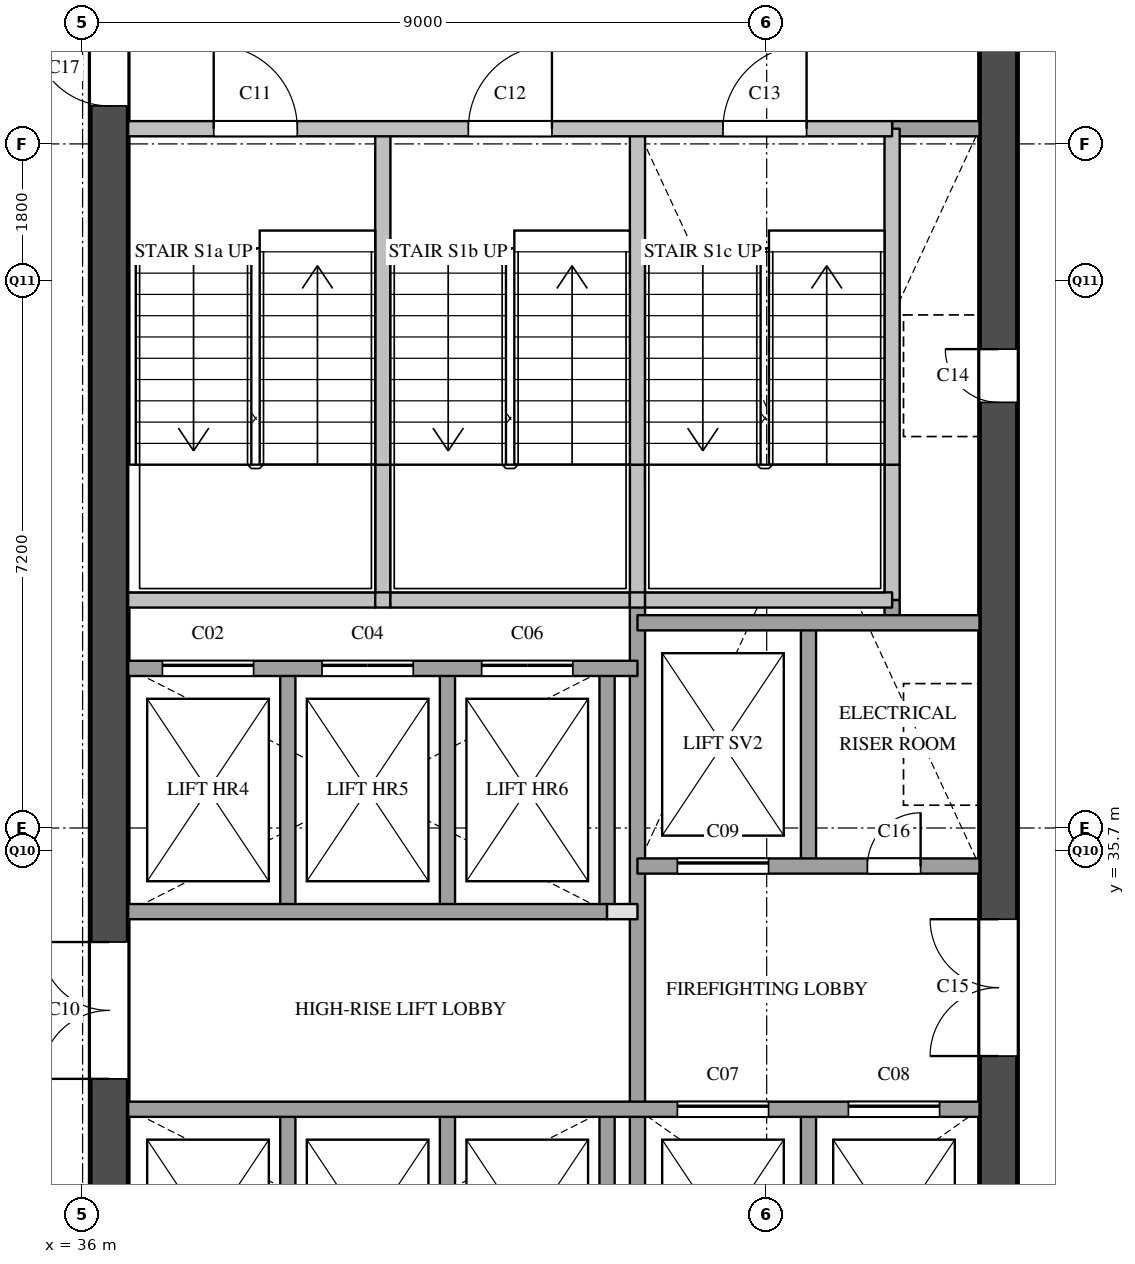
"""IFC4 building model, lengths in metres.
Left out: names, types, materials, properties, quantities, classifications, styles, units other than length and angle.
Written with IfcOpenShell. Run it as: python <this file> out.ifc"""

import sys

from ifc_helpers import new_model, si_unit, direction, frame, frame_2d, origin, place, context, subcontext, project, spatial, rectangle, extrude, element, fill, save


model = new_model("IFC4")
c1 = context("Model", 3, precision=1e-05, world=origin(), true_north=direction((0.0, 1.0)))
c2 = subcontext(c1, "Body", "Model", "MODEL_VIEW")
j1 = project(units=[si_unit("LENGTHUNIT", "METRE"), si_unit("PLANEANGLEUNIT", "RADIAN")], contexts=[c1])
p1 = place(None, origin())
s1 = spatial("IfcSite", under=j1, at=p1, CompositionType="ELEMENT")
p2 = place(p1, origin())
s2 = spatial("IfcBuilding", under=s1, at=p2, CompositionType="ELEMENT")
p3 = place(p2, frame((0.0, 0.0, 170.0)))
s3 = spatial("IfcBuildingStorey", under=s2, at=p3, CompositionType="ELEMENT", Elevation=170.0)
p4 = place(p3, frame((36.35, 29.1, 0.0), z_axis=(0.0, 0.0, 1.0), x_axis=(0.0, 1.0, 0.0)))
e1 = element("IfcWall", 1, at=p4, inside=s3, PredefinedType="SHEAR", context=c2, shape_type="SweptSolid", body=[
    extrude(rectangle(XDim=20.3, YDim=0.5, at=frame_2d((10.15, 0.0))), origin(), (0.0, 0.0, 1.0), 3.6),
])
p5 = place(p4, frame((3.6, 0.0, 0.0)))
e2 = element("IfcOpeningElement", 2, at=p5, cuts=e1, PredefinedType="OPENING", context=c2, shape_type="SweptSolid", body=[
    extrude(rectangle(XDim=1.8, YDim=2.1, at=frame_2d((0.9, 1.05))), frame((0.0, 0.26, 0.0), z_axis=(0.0, -1.0, 0.0), x_axis=(1.0, 0.0, 0.0)), (0.0, 0.0, 1.0), 0.52),
])
p6 = place(p4, frame((16.4, 0.0, 0.0)))
e3 = element("IfcOpeningElement", 3, at=p6, cuts=e1, PredefinedType="OPENING", context=c2, shape_type="SweptSolid", body=[
    extrude(rectangle(XDim=1.0, YDim=2.1, at=frame_2d((0.5, 1.05))), frame((0.0, 0.26, 0.0), z_axis=(0.0, -1.0, 0.0), x_axis=(1.0, 0.0, 0.0)), (0.0, 0.0, 1.0), 0.52),
])
p7 = place(p3, frame((48.05, 29.1, 0.0), z_axis=(0.0, 0.0, 1.0), x_axis=(0.0, 1.0, 0.0)))
e4 = element("IfcWall", 4, at=p7, inside=s3, PredefinedType="SHEAR", context=c2, shape_type="SweptSolid", body=[
    extrude(rectangle(XDim=20.3, YDim=0.5, at=frame_2d((10.15, 0.0))), origin(), (0.0, 0.0, 1.0), 3.6),
])
p8 = place(p7, frame((12.5, 0.0, 0.0)))
e5 = element("IfcOpeningElement", 5, at=p8, cuts=e4, PredefinedType="OPENING", context=c2, shape_type="SweptSolid", body=[
    extrude(rectangle(XDim=0.7, YDim=2.1, at=frame_2d((0.35, 1.05))), frame((0.0, 0.26, 0.0), z_axis=(0.0, -1.0, 0.0), x_axis=(1.0, 0.0, 0.0)), (0.0, 0.0, 1.0), 0.52),
])
p9 = place(p7, frame((3.9, 0.0, 0.0)))
e6 = element("IfcOpeningElement", 6, at=p9, cuts=e4, PredefinedType="OPENING", context=c2, shape_type="SweptSolid", body=[
    extrude(rectangle(XDim=1.8, YDim=2.1, at=frame_2d((0.9, 1.05))), frame((0.0, 0.26, 0.0), z_axis=(0.0, -1.0, 0.0), x_axis=(1.0, 0.0, 0.0)), (0.0, 0.0, 1.0), 0.52),
])
p10 = place(p3, frame((38.7, 29.1, 0.0), z_axis=(0.0, 0.0, 1.0), x_axis=(0.0, 1.0, 0.0)))
e7 = element("IfcWall", 7, at=p10, inside=s3, PredefinedType="SOLIDWALL", context=c2, shape_type="SweptSolid", body=[
    extrude(rectangle(XDim=3.2, YDim=0.2, at=frame_2d((1.6, 0.0))), origin(), (0.0, 0.0, 1.0), 3.6),
])
p11 = place(p3, frame((38.7, 34.9, 0.0), z_axis=(0.0, 0.0, 1.0), x_axis=(0.0, 1.0, 0.0)))
e8 = element("IfcWall", 8, at=p11, inside=s3, PredefinedType="SOLIDWALL", context=c2, shape_type="SweptSolid", body=[
    extrude(rectangle(XDim=3.2, YDim=0.2, at=frame_2d((1.6, 0.0))), origin(), (0.0, 0.0, 1.0), 3.6),
])
p12 = place(p3, frame((39.95, 39.0, 0.0), z_axis=(0.0, 0.0, 1.0), x_axis=(0.0, 1.0, 0.0)))
e9 = element("IfcWall", 9, at=p12, inside=s3, PredefinedType="SOLIDWALL", context=c2, shape_type="SweptSolid", body=[
    extrude(rectangle(XDim=1.78, YDim=0.2, at=frame_2d((0.89, 0.0))), origin(), (0.0, 0.0, 1.0), 3.6),
])
p13 = place(p3, frame((39.95, 40.78, 0.0), z_axis=(0.0, 0.0, 1.0), x_axis=(0.0, 1.0, 0.0)))
e10 = element("IfcWall", 10, at=p13, inside=s3, PredefinedType="SOLIDWALL", context=c2, shape_type="SweptSolid", body=[
    extrude(rectangle(XDim=4.42, YDim=0.2, at=frame_2d((2.21, 0.0))), origin(), (0.0, 0.0, 1.0), 3.6),
])
p14 = place(p3, frame((40.8, 29.1, 0.0), z_axis=(0.0, 0.0, 1.0), x_axis=(0.0, 1.0, 0.0)))
e11 = element("IfcWall", 11, at=p14, inside=s3, PredefinedType="SOLIDWALL", context=c2, shape_type="SweptSolid", body=[
    extrude(rectangle(XDim=3.2, YDim=0.2, at=frame_2d((1.6, 0.0))), origin(), (0.0, 0.0, 1.0), 3.6),
])
p15 = place(p3, frame((40.8, 34.9, 0.0), z_axis=(0.0, 0.0, 1.0), x_axis=(0.0, 1.0, 0.0)))
e12 = element("IfcWall", 12, at=p15, inside=s3, PredefinedType="SOLIDWALL", context=c2, shape_type="SweptSolid", body=[
    extrude(rectangle(XDim=3.2, YDim=0.2, at=frame_2d((1.6, 0.0))), origin(), (0.0, 0.0, 1.0), 3.6),
])
p16 = place(p3, frame((42.9, 29.1, 0.0), z_axis=(0.0, 0.0, 1.0), x_axis=(0.0, 1.0, 0.0)))
e13 = element("IfcWall", 13, at=p16, inside=s3, PredefinedType="SOLIDWALL", context=c2, shape_type="SweptSolid", body=[
    extrude(rectangle(XDim=3.2, YDim=0.2, at=frame_2d((1.6, 0.0))), origin(), (0.0, 0.0, 1.0), 3.6),
])
p17 = place(p3, frame((42.9, 34.9, 0.0), z_axis=(0.0, 0.0, 1.0), x_axis=(0.0, 1.0, 0.0)))
e14 = element("IfcWall", 14, at=p17, inside=s3, PredefinedType="SOLIDWALL", context=c2, shape_type="SweptSolid", body=[
    extrude(rectangle(XDim=3.2, YDim=0.2, at=frame_2d((1.6, 0.0))), origin(), (0.0, 0.0, 1.0), 3.6),
])
p18 = place(p3, frame((43.3, 29.1, 0.0), z_axis=(0.0, 0.0, 1.0), x_axis=(0.0, 1.0, 0.0)))
e15 = element("IfcWall", 15, at=p18, inside=s3, PredefinedType="SOLIDWALL", context=c2, shape_type="SweptSolid", body=[
    extrude(rectangle(XDim=9.9, YDim=0.2, at=frame_2d((4.95, 0.0))), origin(), (0.0, 0.0, 1.0), 3.6),
])
p19 = place(p3, frame((43.3, 39.0, 0.0), z_axis=(0.0, 0.0, 1.0), x_axis=(0.0, 1.0, 0.0)))
e16 = element("IfcWall", 16, at=p19, inside=s3, PredefinedType="SOLIDWALL", context=c2, shape_type="SweptSolid", body=[
    extrude(rectangle(XDim=1.78, YDim=0.2, at=frame_2d((0.89, 0.0))), origin(), (0.0, 0.0, 1.0), 3.6),
])
p20 = place(p3, frame((43.3, 40.78, 0.0), z_axis=(0.0, 0.0, 1.0), x_axis=(0.0, 1.0, 0.0)))
e17 = element("IfcWall", 17, at=p20, inside=s3, PredefinedType="SOLIDWALL", context=c2, shape_type="SweptSolid", body=[
    extrude(rectangle(XDim=4.42, YDim=0.2, at=frame_2d((2.21, 0.0))), origin(), (0.0, 0.0, 1.0), 3.6),
])
for number, where, z_axis, x_axis in (
    (18, (45.55, 29.1, 0.0), (0.0, 0.0, 1.0), (0.0, 1.0, 0.0)),
    (19, (45.55, 35.5, 0.0), (0.0, 0.0, 1.0), (0.0, 1.0, 0.0)),
):
    element("IfcWall", number, at=place(p3, frame(where, z_axis=z_axis, x_axis=x_axis)), inside=s3, PredefinedType="SOLIDWALL", context=c2, shape_type="SweptSolid", body=[
        extrude(rectangle(XDim=3.2, YDim=0.2, at=frame_2d((1.6, 0.0))), origin(), (0.0, 0.0, 1.0), 3.6),
    ])
p21 = place(p3, frame((46.65, 38.7, 0.0), z_axis=(0.0, 0.0, 1.0), x_axis=(0.0, 1.0, 0.0)))
e20 = element("IfcWall", 20, at=p21, inside=s3, PredefinedType="SOLIDWALL", context=c2, shape_type="SweptSolid", body=[
    extrude(rectangle(XDim=0.3, YDim=0.2, at=frame_2d((0.15, 0.0))), origin(), (0.0, 0.0, 1.0), 3.6),
])
p22 = place(p3, frame((46.65, 39.0, 0.0), z_axis=(0.0, 0.0, 1.0), x_axis=(0.0, 1.0, 0.0)))
e21 = element("IfcWall", 21, at=p22, inside=s3, PredefinedType="SOLIDWALL", context=c2, shape_type="SweptSolid", body=[
    extrude(rectangle(XDim=1.78, YDim=0.2, at=frame_2d((0.89, 0.0))), origin(), (0.0, 0.0, 1.0), 3.6),
])
p23 = place(p3, frame((46.65, 40.78, 0.0), z_axis=(0.0, 0.0, 1.0), x_axis=(0.0, 1.0, 0.0)))
e22 = element("IfcWall", 22, at=p23, inside=s3, PredefinedType="SOLIDWALL", context=c2, shape_type="SweptSolid", body=[
    extrude(rectangle(XDim=4.42, YDim=0.2, at=frame_2d((2.21, 0.0))), origin(), (0.0, 0.0, 1.0), 3.6),
])
p24 = place(p3, frame((36.6, 32.3, 0.0), z_axis=(0.0, 0.0, 1.0), x_axis=(1.0, 0.0, 0.0)))
e23 = element("IfcWall", 23, at=p24, inside=s3, PredefinedType="SOLIDWALL", context=c2, shape_type="SweptSolid", body=[
    extrude(rectangle(XDim=11.2, YDim=0.2, at=frame_2d((5.6, 0.0))), origin(), (0.0, 0.0, 1.0), 3.6),
])
p25 = place(p24, frame((7.225, 0.0, 0.0)))
e24 = element("IfcOpeningElement", 24, at=p25, cuts=e23, PredefinedType="OPENING", context=c2, shape_type="SweptSolid", body=[
    extrude(rectangle(XDim=1.2, YDim=2.1, at=frame_2d((0.6, 1.05))), frame((0.0, 0.11, 0.0), z_axis=(0.0, -1.0, 0.0), x_axis=(1.0, 0.0, 0.0)), (0.0, 0.0, 1.0), 0.22),
])
p26 = place(p24, frame((9.475, 0.0, 0.0)))
e25 = element("IfcOpeningElement", 25, at=p26, cuts=e23, PredefinedType="OPENING", context=c2, shape_type="SweptSolid", body=[
    extrude(rectangle(XDim=1.2, YDim=2.1, at=frame_2d((0.6, 1.05))), frame((0.0, 0.11, 0.0), z_axis=(0.0, -1.0, 0.0), x_axis=(1.0, 0.0, 0.0)), (0.0, 0.0, 1.0), 0.22),
])
p27 = place(p3, frame((42.9, 34.9, 0.0), z_axis=(0.0, 0.0, 1.0), x_axis=(1.0, 0.0, 0.0)))
e26 = element("IfcWall", 26, at=p27, inside=s3, PredefinedType="PARTITIONING", context=c2, shape_type="SweptSolid", body=[
    extrude(rectangle(XDim=0.4, YDim=0.2, at=frame_2d((0.2, 0.0))), origin(), (0.0, 0.0, 1.0), 3.6),
])
p28 = place(p3, frame((36.6, 34.9, 0.0), z_axis=(0.0, 0.0, 1.0), x_axis=(1.0, 0.0, 0.0)))
e27 = element("IfcWall", 27, at=p28, inside=s3, PredefinedType="SOLIDWALL", context=c2, shape_type="SweptSolid", body=[
    extrude(rectangle(XDim=6.3, YDim=0.2, at=frame_2d((3.15, 0.0))), origin(), (0.0, 0.0, 1.0), 3.6),
])
p29 = place(p3, frame((43.3, 35.5, 0.0), z_axis=(0.0, 0.0, 1.0), x_axis=(1.0, 0.0, 0.0)))
e28 = element("IfcWall", 28, at=p29, inside=s3, PredefinedType="SOLIDWALL", context=c2, shape_type="SweptSolid", body=[
    extrude(rectangle(XDim=4.5, YDim=0.2, at=frame_2d((2.25, 0.0))), origin(), (0.0, 0.0, 1.0), 3.6),
])
p30 = place(p29, frame((0.525, 0.0, 0.0)))
e29 = element("IfcOpeningElement", 29, at=p30, cuts=e28, PredefinedType="OPENING", context=c2, shape_type="SweptSolid", body=[
    extrude(rectangle(XDim=1.2, YDim=2.1, at=frame_2d((0.6, 1.05))), frame((0.0, 0.11, 0.0), z_axis=(0.0, -1.0, 0.0), x_axis=(1.0, 0.0, 0.0)), (0.0, 0.0, 1.0), 0.22),
])
p31 = place(p29, frame((3.025, 0.0, 0.0)))
e30 = element("IfcOpeningElement", 30, at=p31, cuts=e28, PredefinedType="OPENING", context=c2, shape_type="SweptSolid", body=[
    extrude(rectangle(XDim=0.7, YDim=2.1, at=frame_2d((0.35, 1.05))), frame((0.0, 0.11, 0.0), z_axis=(0.0, -1.0, 0.0), x_axis=(1.0, 0.0, 0.0)), (0.0, 0.0, 1.0), 0.22),
])
p32 = place(p3, frame((36.6, 38.1, 0.0), z_axis=(0.0, 0.0, 1.0), x_axis=(1.0, 0.0, 0.0)))
e31 = element("IfcWall", 31, at=p32, inside=s3, PredefinedType="SOLIDWALL", context=c2, shape_type="SweptSolid", body=[
    extrude(rectangle(XDim=6.7, YDim=0.2, at=frame_2d((3.35, 0.0))), origin(), (0.0, 0.0, 1.0), 3.6),
])
p33 = place(p32, frame((0.45, 0.0, 0.0)))
e32 = element("IfcOpeningElement", 32, at=p33, cuts=e31, PredefinedType="OPENING", context=c2, shape_type="SweptSolid", body=[
    extrude(rectangle(XDim=1.2, YDim=2.1, at=frame_2d((0.6, 1.05))), frame((0.0, 0.11, 0.0), z_axis=(0.0, -1.0, 0.0), x_axis=(1.0, 0.0, 0.0)), (0.0, 0.0, 1.0), 0.22),
])
p34 = place(p32, frame((2.55, 0.0, 0.0)))
e33 = element("IfcOpeningElement", 33, at=p34, cuts=e31, PredefinedType="OPENING", context=c2, shape_type="SweptSolid", body=[
    extrude(rectangle(XDim=1.2, YDim=2.1, at=frame_2d((0.6, 1.05))), frame((0.0, 0.11, 0.0), z_axis=(0.0, -1.0, 0.0), x_axis=(1.0, 0.0, 0.0)), (0.0, 0.0, 1.0), 0.22),
])
p35 = place(p32, frame((4.65, 0.0, 0.0)))
e34 = element("IfcOpeningElement", 34, at=p35, cuts=e31, PredefinedType="OPENING", context=c2, shape_type="SweptSolid", body=[
    extrude(rectangle(XDim=1.2, YDim=2.1, at=frame_2d((0.6, 1.05))), frame((0.0, 0.11, 0.0), z_axis=(0.0, -1.0, 0.0), x_axis=(1.0, 0.0, 0.0)), (0.0, 0.0, 1.0), 0.22),
])
p36 = place(p3, frame((43.3, 38.7, 0.0), z_axis=(0.0, 0.0, 1.0), x_axis=(1.0, 0.0, 0.0)))
e35 = element("IfcWall", 35, at=p36, inside=s3, PredefinedType="SOLIDWALL", context=c2, shape_type="SweptSolid", body=[
    extrude(rectangle(XDim=4.5, YDim=0.2, at=frame_2d((2.25, 0.0))), origin(), (0.0, 0.0, 1.0), 3.6),
])
p37 = place(p3, frame((36.6, 39.0, 0.0), z_axis=(0.0, 0.0, 1.0), x_axis=(1.0, 0.0, 0.0)))
e36 = element("IfcWall", 36, at=p37, inside=s3, PredefinedType="SOLIDWALL", context=c2, shape_type="SweptSolid", body=[
    extrude(rectangle(XDim=3.25, YDim=0.2, at=frame_2d((1.625, 0.0))), origin(), (0.0, 0.0, 1.0), 3.6),
])
p38 = place(p3, frame((39.85, 39.0, 0.0), z_axis=(0.0, 0.0, 1.0), x_axis=(1.0, 0.0, 0.0)))
e37 = element("IfcWall", 37, at=p38, inside=s3, PredefinedType="SOLIDWALL", context=c2, shape_type="SweptSolid", body=[
    extrude(rectangle(XDim=0.2, YDim=0.2, at=frame_2d((0.1, 0.0))), origin(), (0.0, 0.0, 1.0), 3.6),
])
p39 = place(p3, frame((40.05, 39.0, 0.0), z_axis=(0.0, 0.0, 1.0), x_axis=(1.0, 0.0, 0.0)))
e38 = element("IfcWall", 38, at=p39, inside=s3, PredefinedType="SOLIDWALL", context=c2, shape_type="SweptSolid", body=[
    extrude(rectangle(XDim=3.15, YDim=0.2, at=frame_2d((1.575, 0.0))), origin(), (0.0, 0.0, 1.0), 3.6),
])
p40 = place(p3, frame((43.2, 39.0, 0.0), z_axis=(0.0, 0.0, 1.0), x_axis=(1.0, 0.0, 0.0)))
e39 = element("IfcWall", 39, at=p40, inside=s3, PredefinedType="SOLIDWALL", context=c2, shape_type="SweptSolid", body=[
    extrude(rectangle(XDim=0.2, YDim=0.2, at=frame_2d((0.1, 0.0))), origin(), (0.0, 0.0, 1.0), 3.6),
])
p41 = place(p3, frame((43.4, 39.0, 0.0), z_axis=(0.0, 0.0, 1.0), x_axis=(1.0, 0.0, 0.0)))
e40 = element("IfcWall", 40, at=p41, inside=s3, PredefinedType="SOLIDWALL", context=c2, shape_type="SweptSolid", body=[
    extrude(rectangle(XDim=3.25, YDim=0.2, at=frame_2d((1.625, 0.0))), origin(), (0.0, 0.0, 1.0), 3.6),
])
p42 = place(p3, frame((46.65, 45.2, 0.0), z_axis=(0.0, 0.0, 1.0), x_axis=(1.0, 0.0, 0.0)))
e41 = element("IfcWall", 41, at=p42, inside=s3, PredefinedType="SOLIDWALL", context=c2, shape_type="SweptSolid", body=[
    extrude(rectangle(XDim=1.15, YDim=0.2, at=frame_2d((0.575, 0.0))), origin(), (0.0, 0.0, 1.0), 3.6),
])
p43 = place(p3, frame((36.6, 45.2, 0.0), z_axis=(0.0, 0.0, 1.0), x_axis=(1.0, 0.0, 0.0)))
e42 = element("IfcWall", 42, at=p43, inside=s3, PredefinedType="SOLIDWALL", context=c2, shape_type="SweptSolid", body=[
    extrude(rectangle(XDim=10.05, YDim=0.2, at=frame_2d((5.025, 0.0))), origin(), (0.0, 0.0, 1.0), 3.6),
])
p44 = place(p43, frame((1.125, 0.0, 0.0)))
e43 = element("IfcOpeningElement", 43, at=p44, cuts=e42, PredefinedType="OPENING", context=c2, shape_type="SweptSolid", body=[
    extrude(rectangle(XDim=1.1, YDim=2.1, at=frame_2d((0.55, 1.05))), frame((0.0, 0.11, 0.0), z_axis=(0.0, -1.0, 0.0), x_axis=(1.0, 0.0, 0.0)), (0.0, 0.0, 1.0), 0.22),
])
p45 = place(p43, frame((4.475, 0.0, 0.0)))
e44 = element("IfcOpeningElement", 44, at=p45, cuts=e42, PredefinedType="OPENING", context=c2, shape_type="SweptSolid", body=[
    extrude(rectangle(XDim=1.1, YDim=2.1, at=frame_2d((0.55, 1.05))), frame((0.0, 0.11, 0.0), z_axis=(0.0, -1.0, 0.0), x_axis=(1.0, 0.0, 0.0)), (0.0, 0.0, 1.0), 0.22),
])
p46 = place(p43, frame((7.825, 0.0, 0.0)))
e45 = element("IfcOpeningElement", 45, at=p46, cuts=e42, PredefinedType="OPENING", context=c2, shape_type="SweptSolid", body=[
    extrude(rectangle(XDim=1.1, YDim=2.1, at=frame_2d((0.55, 1.05))), frame((0.0, 0.11, 0.0), z_axis=(0.0, -1.0, 0.0), x_axis=(1.0, 0.0, 0.0)), (0.0, 0.0, 1.0), 0.22),
])
p47 = place(p33, origin())
e46 = element("IfcDoor", 46, at=p47, inside=s3, OperationType="SLIDING_TO_LEFT", PredefinedType="DOOR", context=c2, shape_type="SweptSolid", body=[
    extrude(rectangle(XDim=1.2, YDim=2.1, at=frame_2d((0.6, 1.05))), frame((0.0, 0.025, 0.0), z_axis=(0.0, -1.0, 0.0), x_axis=(1.0, 0.0, 0.0)), (0.0, 0.0, 1.0), 0.05),
])
fill(e32, e46)
p48 = place(p34, origin())
e47 = element("IfcDoor", 47, at=p48, inside=s3, OperationType="SLIDING_TO_LEFT", PredefinedType="DOOR", context=c2, shape_type="SweptSolid", body=[
    extrude(rectangle(XDim=1.2, YDim=2.1, at=frame_2d((0.6, 1.05))), frame((0.0, 0.025, 0.0), z_axis=(0.0, -1.0, 0.0), x_axis=(1.0, 0.0, 0.0)), (0.0, 0.0, 1.0), 0.05),
])
fill(e33, e47)
p49 = place(p35, origin())
e48 = element("IfcDoor", 48, at=p49, inside=s3, OperationType="SLIDING_TO_LEFT", PredefinedType="DOOR", context=c2, shape_type="SweptSolid", body=[
    extrude(rectangle(XDim=1.2, YDim=2.1, at=frame_2d((0.6, 1.05))), frame((0.0, 0.025, 0.0), z_axis=(0.0, -1.0, 0.0), x_axis=(1.0, 0.0, 0.0)), (0.0, 0.0, 1.0), 0.05),
])
fill(e34, e48)
p50 = place(p25, origin())
e49 = element("IfcDoor", 49, at=p50, inside=s3, OperationType="SLIDING_TO_LEFT", PredefinedType="DOOR", context=c2, shape_type="SweptSolid", body=[
    extrude(rectangle(XDim=1.2, YDim=2.1, at=frame_2d((0.6, 1.05))), frame((0.0, 0.025, 0.0), z_axis=(0.0, -1.0, 0.0), x_axis=(1.0, 0.0, 0.0)), (0.0, 0.0, 1.0), 0.05),
])
fill(e24, e49)
p51 = place(p26, origin())
e50 = element("IfcDoor", 50, at=p51, inside=s3, OperationType="SLIDING_TO_LEFT", PredefinedType="DOOR", context=c2, shape_type="SweptSolid", body=[
    extrude(rectangle(XDim=1.2, YDim=2.1, at=frame_2d((0.6, 1.05))), frame((0.0, 0.025, 0.0), z_axis=(0.0, -1.0, 0.0), x_axis=(1.0, 0.0, 0.0)), (0.0, 0.0, 1.0), 0.05),
])
fill(e25, e50)
p52 = place(p30, origin())
e51 = element("IfcDoor", 51, at=p52, inside=s3, OperationType="SLIDING_TO_LEFT", PredefinedType="DOOR", context=c2, shape_type="SweptSolid", body=[
    extrude(rectangle(XDim=1.2, YDim=2.1, at=frame_2d((0.6, 1.05))), frame((0.0, 0.025, 0.0), z_axis=(0.0, -1.0, 0.0), x_axis=(1.0, 0.0, 0.0)), (0.0, 0.0, 1.0), 0.05),
])
fill(e29, e51)
p53 = place(p5, origin())
e52 = element("IfcDoor", 52, at=p53, inside=s3, OperationType="DOUBLE_DOOR_SINGLE_SWING", PredefinedType="DOOR", context=c2, shape_type="SweptSolid", body=[
    extrude(rectangle(XDim=1.8, YDim=2.1, at=frame_2d((0.9, 1.05))), frame((0.0, 0.025, 0.0), z_axis=(0.0, -1.0, 0.0), x_axis=(1.0, 0.0, 0.0)), (0.0, 0.0, 1.0), 0.05),
])
fill(e2, e52)
p54 = place(p44, origin())
e53 = element("IfcDoor", 53, at=p54, inside=s3, OperationType="SINGLE_SWING_LEFT", PredefinedType="DOOR", context=c2, shape_type="SweptSolid", body=[
    extrude(rectangle(XDim=1.1, YDim=2.1, at=frame_2d((0.55, 1.05))), frame((0.0, 0.025, 0.0), z_axis=(0.0, -1.0, 0.0), x_axis=(1.0, 0.0, 0.0)), (0.0, 0.0, 1.0), 0.05),
])
fill(e43, e53)
p55 = place(p45, origin())
e54 = element("IfcDoor", 54, at=p55, inside=s3, OperationType="SINGLE_SWING_RIGHT", PredefinedType="DOOR", context=c2, shape_type="SweptSolid", body=[
    extrude(rectangle(XDim=1.1, YDim=2.1, at=frame_2d((0.55, 1.05))), frame((0.0, 0.025, 0.0), z_axis=(0.0, -1.0, 0.0), x_axis=(1.0, 0.0, 0.0)), (0.0, 0.0, 1.0), 0.05),
])
fill(e44, e54)
p56 = place(p46, origin())
e55 = element("IfcDoor", 55, at=p56, inside=s3, OperationType="SINGLE_SWING_RIGHT", PredefinedType="DOOR", context=c2, shape_type="SweptSolid", body=[
    extrude(rectangle(XDim=1.1, YDim=2.1, at=frame_2d((0.55, 1.05))), frame((0.0, 0.025, 0.0), z_axis=(0.0, -1.0, 0.0), x_axis=(1.0, 0.0, 0.0)), (0.0, 0.0, 1.0), 0.05),
])
fill(e45, e55)
p57 = place(p8, origin())
e56 = element("IfcDoor", 56, at=p57, inside=s3, OperationType="SINGLE_SWING_RIGHT", PredefinedType="DOOR", context=c2, shape_type="SweptSolid", body=[
    extrude(rectangle(XDim=0.7, YDim=2.1, at=frame_2d((0.35, 1.05))), frame((0.0, 0.025, 0.0), z_axis=(0.0, -1.0, 0.0), x_axis=(1.0, 0.0, 0.0)), (0.0, 0.0, 1.0), 0.05),
])
fill(e5, e56)
p58 = place(p9, origin())
e57 = element("IfcDoor", 57, at=p58, inside=s3, OperationType="DOUBLE_DOOR_SINGLE_SWING", PredefinedType="DOOR", context=c2, shape_type="SweptSolid", body=[
    extrude(rectangle(XDim=1.8, YDim=2.1, at=frame_2d((0.9, 1.05))), frame((0.0, 0.025, 0.0), z_axis=(0.0, -1.0, 0.0), x_axis=(1.0, 0.0, 0.0)), (0.0, 0.0, 1.0), 0.05),
])
fill(e6, e57)
p59 = place(p31, origin())
e58 = element("IfcDoor", 58, at=p59, inside=s3, OperationType="SINGLE_SWING_RIGHT", PredefinedType="DOOR", context=c2, shape_type="SweptSolid", body=[
    extrude(rectangle(XDim=0.7, YDim=2.1, at=frame_2d((0.35, 1.05))), frame((0.0, 0.025, 0.0), z_axis=(0.0, -1.0, 0.0), x_axis=(1.0, 0.0, 0.0)), (0.0, 0.0, 1.0), 0.05),
])
fill(e30, e58)
p60 = place(p6, origin())
e59 = element("IfcDoor", 59, at=p60, inside=s3, OperationType="SINGLE_SWING_RIGHT", PredefinedType="DOOR", context=c2, shape_type="SweptSolid", body=[
    extrude(rectangle(XDim=1.0, YDim=2.1, at=frame_2d((0.5, 1.05))), frame((0.0, 0.025, 0.0), z_axis=(0.0, -1.0, 0.0), x_axis=(1.0, 0.0, 0.0)), (0.0, 0.0, 1.0), 0.05),
])
fill(e3, e59)
save(model, sys.argv[1])
